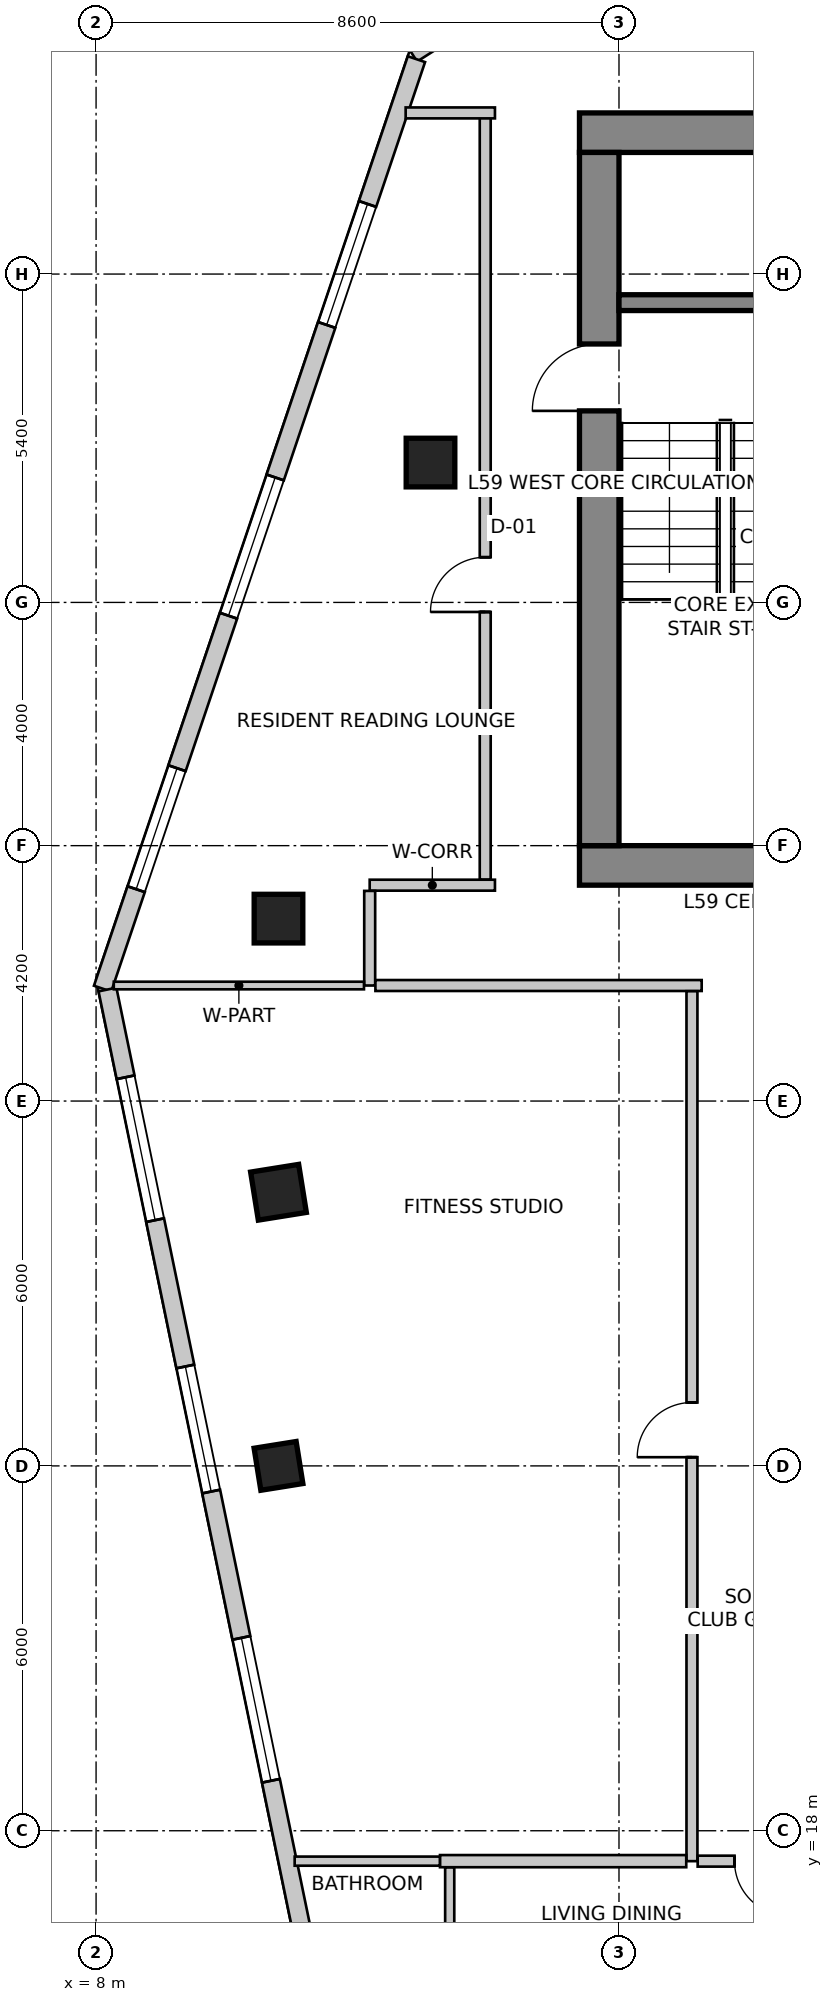
"""IFC4 building model, lengths in metres.
Left out: names, types, materials, properties, quantities, classifications, styles, units other than length and angle.
Written with IfcOpenShell. Run it as: python <this file> out.ifc"""

import sys

from ifc_helpers import new_model, si_unit, direction, frame, frame_2d, origin, origin_2d, place, context, subcontext, project, spatial, rectangle, extrude, source, transform, mapped, element, fill, save


model = new_model("IFC4")
c1 = context("Model", 3, precision=1e-05, world=origin(), true_north=direction((0.0, 1.0)))
c2 = subcontext(c1, "Body", "Model", "MODEL_VIEW")
j1 = project(units=[si_unit("LENGTHUNIT", "METRE"), si_unit("PLANEANGLEUNIT", "RADIAN")], contexts=[c1])
p1 = place(None, origin())
s1 = spatial("IfcSite", under=j1, at=p1, CompositionType="ELEMENT")
p2 = place(p1, origin())
s2 = spatial("IfcBuilding", under=s1, at=p2, CompositionType="ELEMENT")
p3 = place(p2, frame((0.0, 0.0, 232.4)))
s3 = spatial("IfcBuildingStorey", under=s2, at=p3, CompositionType="ELEMENT", Elevation=232.4)
p4 = place(p3, frame((15.95, 45.925, 0.0), z_axis=(0.0, 0.0, 1.0), x_axis=(1.0, 0.0, 0.0)))
e1 = element("IfcWall", 1, at=p4, inside=s3, PredefinedType="SHEAR", context=c2, shape_type="SweptSolid", body=[
    extrude(rectangle(XDim=15.7, YDim=0.65, at=frame_2d((7.85, 0.0))), origin(), (0.0, 0.0, 1.0), 3.5),
])
p5 = place(p3, frame((15.95, 33.875, 0.0), z_axis=(0.0, 0.0, 1.0), x_axis=(1.0, 0.0, 0.0)))
e2 = element("IfcWall", 2, at=p5, inside=s3, PredefinedType="SHEAR", context=c2, shape_type="SweptSolid", body=[
    extrude(rectangle(XDim=15.7, YDim=0.65, at=frame_2d((7.85, 0.0))), origin(), (0.0, 0.0, 1.0), 3.5),
])
m1 = source(origin(), c2, "Body", "SweptSolid", [
    extrude(rectangle(XDim=1.1, YDim=2.15, at=frame_2d((0.55, 1.075))), frame((0.0, 0.335, 0.0), z_axis=(0.0, -1.0, 0.0), x_axis=(1.0, 0.0, 0.0)), (0.0, 0.0, 1.0), 0.67),
])
p6 = place(p5, frame((10.08, 0.0, 0.0)))
e3 = element("IfcOpeningElement", 3, at=p6, cuts=e2, PredefinedType="OPENING", context=c2, shape_type="MappedRepresentation", body=[
    mapped(m1, transform((0.0, 0.0, 0.0), scale=1.0)),
])
p7 = place(p3, frame((16.275, 34.2, 0.0), z_axis=(0.0, 0.0, 1.0), x_axis=(0.0, 1.0, 0.0)))
e4 = element("IfcWall", 4, at=p7, inside=s3, PredefinedType="SHEAR", context=c2, shape_type="SweptSolid", body=[
    extrude(rectangle(XDim=11.4, YDim=0.65, at=frame_2d((5.7, 0.0))), origin(), (0.0, 0.0, 1.0), 3.5),
])
p8 = place(p7, frame((7.15, 0.0, 0.0)))
e5 = element("IfcOpeningElement", 5, at=p8, cuts=e4, PredefinedType="OPENING", context=c2, shape_type="MappedRepresentation", body=[
    mapped(m1, transform((0.0, 0.0, 0.0), scale=1.0)),
])
p9 = place(p3, frame((16.6, 43.13, 0.0), z_axis=(0.0, 0.0, 1.0), x_axis=(1.0, 0.0, 0.0)))
e6 = element("IfcWall", 6, at=p9, inside=s3, PredefinedType="SHEAR", context=c2, shape_type="SweptSolid", body=[
    extrude(rectangle(XDim=3.5, YDim=0.26, at=frame_2d((1.75, 0.0))), origin(), (0.0, 0.0, 1.0), 3.5),
])
m2 = source(origin(), c2, "Body", "SweptSolid", [
    extrude(rectangle(XDim=0.8, YDim=0.8, at=origin_2d()), origin(), (0.0, 0.0, 1.0), 3.5),
])
for number, where, z_axis, x_axis in (
    (7, (11.0, 33.0, 0.0), (0.0, 0.0, 1.0), (1.0, 0.0, 0.0)),
    (8, (13.5, 40.5, 0.0), (0.0, 0.0, 1.0), (1.0, 0.0, 0.0)),
    (9, (11.0, 28.5, 0.0), (0.0, 0.0, 1.0), (0.158, -0.987, 0.0)),
):
    element("IfcColumn", number, at=place(p3, frame(where, z_axis=z_axis, x_axis=x_axis)), inside=s3, PredefinedType="COLUMN", context=c2, shape_type="MappedRepresentation", body=[
        mapped(m2, transform((0.0, 0.0, 0.0), scale=1.0)),
    ])
m3 = source(origin(), c2, "Body", "SweptSolid", [
    extrude(rectangle(XDim=0.7, YDim=0.7, at=origin_2d()), origin(), (0.0, 0.0, 1.0), 3.5),
])
p10 = place(p3, frame((11.0, 24.0, 0.0), z_axis=(0.0, 0.0, 1.0), x_axis=(0.158158067254, -0.987413806751, 0.0)))
e10 = element("IfcColumn", 10, at=p10, inside=s3, PredefinedType="COLUMN", context=c2, shape_type="MappedRepresentation", body=[
    mapped(m3, transform((0.0, 0.0, 0.0), scale=1.0)),
])
p11 = place(p3, frame((21.874, 52.742, 0.0), z_axis=(0.0, 0.0, 1.0), x_axis=(-0.84365659959, -0.536883173482, 0.0)))
e11 = element("IfcWall", 11, at=p11, inside=s3, PredefinedType="SOLIDWALL", context=c2, shape_type="SweptSolid", body=[
    extrude(rectangle(XDim=10.283, YDim=0.3, at=frame_2d((5.142, 0.0))), origin(), (0.0, 0.0, 1.0), 3.25),
])
m4 = source(origin(), c2, "Body", "SweptSolid", [
    extrude(rectangle(XDim=2.4, YDim=2.2, at=frame_2d((1.2, 1.1))), frame((0.0, 0.16, 0.0), z_axis=(0.0, -1.0, 0.0), x_axis=(1.0, 0.0, 0.0)), (0.0, 0.0, 1.0), 0.32),
])
p12 = place(p11, frame((3.307, 0.0, 0.85)))
e12 = element("IfcOpeningElement", 12, at=p12, cuts=e11, PredefinedType="OPENING", context=c2, shape_type="MappedRepresentation", body=[
    mapped(m4, transform((0.0, 0.0, 0.0), scale=1.0)),
])
p13 = place(p3, frame((13.269, 47.134, 0.0), z_axis=(0.0, 0.0, 1.0), x_axis=(-0.319920776449, -0.947444297464, 0.0)))
e13 = element("IfcWall", 13, at=p13, inside=s3, PredefinedType="SOLIDWALL", context=c2, shape_type="SweptSolid", body=[
    extrude(rectangle(XDim=16.133, YDim=0.3, at=frame_2d((8.067, 0.0))), origin(), (0.0, 0.0, 1.0), 3.25),
])
m5 = source(origin(), c2, "Body", "SweptSolid", [
    extrude(rectangle(XDim=2.1, YDim=2.0, at=frame_2d((1.05, 1.0))), frame((0.0, 0.16, 0.0), z_axis=(0.0, -1.0, 0.0), x_axis=(1.0, 0.0, 0.0)), (0.0, 0.0, 1.0), 0.32),
])
p14 = place(p13, frame((2.513, 0.0, 0.85)))
e14 = element("IfcOpeningElement", 14, at=p14, cuts=e13, PredefinedType="OPENING", context=c2, shape_type="MappedRepresentation", body=[
    mapped(m5, transform((0.0, 0.0, 0.0), scale=1.0)),
])
p15 = place(p13, frame((7.26, 0.0, 0.85)))
e15 = element("IfcOpeningElement", 15, at=p15, cuts=e13, PredefinedType="OPENING", context=c2, shape_type="MappedRepresentation", body=[
    mapped(m4, transform((0.0, 0.0, 0.0), scale=1.0)),
])
p16 = place(p13, frame((12.307, 0.0, 0.85)))
e16 = element("IfcOpeningElement", 16, at=p16, cuts=e13, PredefinedType="OPENING", context=c2, shape_type="MappedRepresentation", body=[
    mapped(m5, transform((0.0, 0.0, 0.0), scale=1.0)),
])
p17 = place(p3, frame((8.188, 31.834, 0.0), z_axis=(0.0, 0.0, 1.0), x_axis=(0.202303475707, -0.979322880217, 0.0)))
e17 = element("IfcWall", 17, at=p17, inside=s3, PredefinedType="SOLIDWALL", context=c2, shape_type="SweptSolid", body=[
    extrude(rectangle(XDim=15.766, YDim=0.3, at=frame_2d((7.883, 0.0))), origin(), (0.0, 0.0, 1.0), 3.25),
])
p18 = place(p17, frame((1.473, 0.0, 0.85)))
e18 = element("IfcOpeningElement", 18, at=p18, cuts=e17, PredefinedType="OPENING", context=c2, shape_type="MappedRepresentation", body=[
    mapped(m4, transform((0.0, 0.0, 0.0), scale=1.0)),
])
p19 = place(p17, frame((6.33, 0.0, 0.85)))
e19 = element("IfcOpeningElement", 19, at=p19, cuts=e17, PredefinedType="OPENING", context=c2, shape_type="MappedRepresentation", body=[
    mapped(m5, transform((0.0, 0.0, 0.0), scale=1.0)),
])
p20 = place(p17, frame((10.887, 0.0, 0.85)))
e20 = element("IfcOpeningElement", 20, at=p20, cuts=e17, PredefinedType="OPENING", context=c2, shape_type="MappedRepresentation", body=[
    mapped(m4, transform((0.0, 0.0, 0.0), scale=1.0)),
])
p21 = place(p3, frame((12.5, 33.55, 0.0), z_axis=(0.0, 0.0, 1.0), x_axis=(1.0, 0.0, 0.0)))
e21 = element("IfcWall", 21, at=p21, inside=s3, PredefinedType="PARTITIONING", context=c2, shape_type="SweptSolid", body=[
    extrude(rectangle(XDim=2.06, YDim=0.18, at=frame_2d((1.03, 0.0))), origin(), (0.0, 0.0, 1.0), 3.25),
])
p22 = place(p3, frame((12.5, 31.9, 0.0), z_axis=(0.0, 0.0, 1.0), x_axis=(0.0, 1.0, 0.0)))
e22 = element("IfcWall", 22, at=p22, inside=s3, PredefinedType="PARTITIONING", context=c2, shape_type="SweptSolid", body=[
    extrude(rectangle(XDim=1.556, YDim=0.18, at=frame_2d((0.778, 0.0))), origin(), (0.0, 0.0, 1.0), 2.934),
])
p23 = place(p3, frame((17.96, 31.9, 0.0), z_axis=(0.0, 0.0, 1.0), x_axis=(-1.0, 0.0, 0.0)))
e23 = element("IfcWall", 23, at=p23, inside=s3, PredefinedType="PARTITIONING", context=c2, shape_type="SweptSolid", body=[
    extrude(rectangle(XDim=5.366, YDim=0.18, at=frame_2d((2.683, 0.0))), origin(), (0.0, 0.0, 1.0), 2.934),
])
p24 = place(p3, frame((14.4, 33.644, 0.0), z_axis=(0.0, 0.0, 1.0), x_axis=(0.0, 1.0, 0.0)))
e24 = element("IfcWall", 24, at=p24, inside=s3, PredefinedType="PARTITIONING", context=c2, shape_type="SweptSolid", body=[
    extrude(rectangle(XDim=12.606, YDim=0.18, at=frame_2d((6.303, 0.0))), origin(), (0.0, 0.0, 1.0), 3.25),
])
m6 = source(origin(), c2, "Body", "SweptSolid", [
    extrude(rectangle(XDim=0.9, YDim=2.15, at=frame_2d((0.45, 1.075))), frame((0.0, 0.1, 0.0), z_axis=(0.0, -1.0, 0.0), x_axis=(1.0, 0.0, 0.0)), (0.0, 0.0, 1.0), 0.2),
])
p25 = place(p24, frame((4.399, 0.0, 0.0)))
e25 = element("IfcOpeningElement", 25, at=p25, cuts=e24, PredefinedType="OPENING", context=c2, shape_type="MappedRepresentation", body=[
    mapped(m6, transform((0.0, 0.0, 0.0), scale=1.0)),
])
p26 = place(p3, frame((14.56, 46.25, 0.0), z_axis=(0.0, 0.0, 1.0), x_axis=(-1.0, 0.0, 0.0)))
e26 = element("IfcWall", 26, at=p26, inside=s3, PredefinedType="PARTITIONING", context=c2, shape_type="SweptSolid", body=[
    extrude(rectangle(XDim=1.469, YDim=0.18, at=frame_2d((0.734, 0.0))), origin(), (0.0, 0.0, 1.0), 3.25),
])
p27 = place(p3, frame((12.406, 31.9, 0.0), z_axis=(0.0, 0.0, 1.0), x_axis=(-1.0, 0.0, 0.0)))
e27 = element("IfcWall", 27, at=p27, inside=s3, PredefinedType="PARTITIONING", context=c2, shape_type="SweptSolid", body=[
    extrude(rectangle(XDim=4.115, YDim=0.125, at=frame_2d((2.057, 0.0))), origin(), (0.0, 0.0, 1.0), 2.542),
])
p28 = place(p3, frame((17.8, 17.5, 0.0), z_axis=(0.0, 0.0, 1.0), x_axis=(0.0, 1.0, 0.0)))
e28 = element("IfcWall", 28, at=p28, inside=s3, PredefinedType="PARTITIONING", context=c2, shape_type="SweptSolid", body=[
    extrude(rectangle(XDim=14.306, YDim=0.18, at=frame_2d((7.153, 0.0))), origin(), (0.0, 0.0, 1.0), 2.766),
])
p29 = place(p28, frame((6.643, 0.0, 0.0)))
e29 = element("IfcOpeningElement", 29, at=p29, cuts=e28, PredefinedType="OPENING", context=c2, shape_type="MappedRepresentation", body=[
    mapped(m6, transform((0.0, 0.0, 0.0), scale=1.0)),
])
p30 = place(p3, frame((20.006, 17.5, 0.0), z_axis=(0.0, 0.0, 1.0), x_axis=(-1.0, 0.0, 0.0)))
e30 = element("IfcWall", 30, at=p30, inside=s3, PredefinedType="PARTITIONING", context=c2, shape_type="SweptSolid", body=[
    extrude(rectangle(XDim=2.112, YDim=0.18, at=frame_2d((1.056, 0.0))), origin(), (0.0, 0.0, 1.0), 3.25),
])
p31 = place(p30, frame((0.606, 0.0, 0.0)))
e31 = element("IfcOpeningElement", 31, at=p31, cuts=e30, PredefinedType="OPENING", context=c2, shape_type="MappedRepresentation", body=[
    mapped(m6, transform((0.0, 0.0, 0.0), scale=1.0)),
])
p32 = place(p3, frame((17.706, 17.5, 0.0), z_axis=(0.0, 0.0, 1.0), x_axis=(-1.0, 0.0, 0.0)))
e32 = element("IfcWall", 32, at=p32, inside=s3, PredefinedType="PARTITIONING", context=c2, shape_type="SweptSolid", body=[
    extrude(rectangle(XDim=4.05, YDim=0.2, at=frame_2d((2.025, 0.0))), origin(), (0.0, 0.0, 1.0), 3.25),
])
p33 = place(p3, frame((13.654, 17.5, 0.0), z_axis=(0.0, 0.0, 1.0), x_axis=(-1.0, 0.0, 0.0)))
e33 = element("IfcWall", 33, at=p33, inside=s3, PredefinedType="PARTITIONING", context=c2, shape_type="SweptSolid", body=[
    extrude(rectangle(XDim=2.388, YDim=0.15, at=frame_2d((1.194, 0.0))), origin(), (0.0, 0.0, 1.0), 3.25),
])
p34 = place(p3, frame((13.816, 12.865, 0.0), z_axis=(0.0, 0.0, 1.0), x_axis=(0.0, 1.0, 0.0)))
e34 = element("IfcWall", 34, at=p34, inside=s3, PredefinedType="PARTITIONING", context=c2, shape_type="SweptSolid", body=[
    extrude(rectangle(XDim=4.531, YDim=0.15, at=frame_2d((2.266, 0.0))), origin(), (0.0, 0.0, 1.0), 3.25),
])
m7 = source(origin(), c2, "Body", "SweptSolid", [
    extrude(rectangle(XDim=0.85, YDim=2.15, at=frame_2d((0.425, 1.075))), frame((0.0, 0.085, 0.0), z_axis=(0.0, -1.0, 0.0), x_axis=(1.0, 0.0, 0.0)), (0.0, 0.0, 1.0), 0.17),
])
p35 = place(p34, frame((1.841, 0.0, 0.0)))
e35 = element("IfcOpeningElement", 35, at=p35, cuts=e34, PredefinedType="OPENING", context=c2, shape_type="MappedRepresentation", body=[
    mapped(m7, transform((0.0, 0.0, 0.0), scale=1.0)),
])
m8 = source(origin(), c2, "Body", "SweptSolid", [
    extrude(rectangle(XDim=2.1, YDim=2.0, at=frame_2d((1.05, 1.0))), frame((0.0, -0.015, 0.0), z_axis=(0.0, -1.0, 0.0), x_axis=(1.0, 0.0, 0.0)), (0.0, 0.0, 1.0), 0.06),
])
p36 = place(p14, origin())
e36 = element("IfcWindow", 36, at=p36, inside=s3, PartitioningType="SINGLE_PANEL", PredefinedType="WINDOW", context=c2, shape_type="MappedRepresentation", body=[
    mapped(m8, transform((0.0, 0.0, 0.0), scale=1.0)),
])
fill(e14, e36)
m9 = source(origin(), c2, "Body", "SweptSolid", [
    extrude(rectangle(XDim=2.4, YDim=2.2, at=frame_2d((1.2, 1.1))), frame((0.0, -0.015, 0.0), z_axis=(0.0, -1.0, 0.0), x_axis=(1.0, 0.0, 0.0)), (0.0, 0.0, 1.0), 0.06),
])
p37 = place(p15, origin())
e37 = element("IfcWindow", 37, at=p37, inside=s3, PartitioningType="SINGLE_PANEL", PredefinedType="WINDOW", context=c2, shape_type="MappedRepresentation", body=[
    mapped(m9, transform((0.0, 0.0, 0.0), scale=1.0)),
])
fill(e15, e37)
p38 = place(p16, origin())
e38 = element("IfcWindow", 38, at=p38, inside=s3, PartitioningType="SINGLE_PANEL", PredefinedType="WINDOW", context=c2, shape_type="MappedRepresentation", body=[
    mapped(m8, transform((0.0, 0.0, 0.0), scale=1.0)),
])
fill(e16, e38)
p39 = place(p18, origin())
e39 = element("IfcWindow", 39, at=p39, inside=s3, PartitioningType="SINGLE_PANEL", PredefinedType="WINDOW", context=c2, shape_type="MappedRepresentation", body=[
    mapped(m9, transform((0.0, 0.0, 0.0), scale=1.0)),
])
fill(e18, e39)
p40 = place(p19, origin())
e40 = element("IfcWindow", 40, at=p40, inside=s3, PartitioningType="SINGLE_PANEL", PredefinedType="WINDOW", context=c2, shape_type="MappedRepresentation", body=[
    mapped(m8, transform((0.0, 0.0, 0.0), scale=1.0)),
])
fill(e19, e40)
p41 = place(p20, origin())
e41 = element("IfcWindow", 41, at=p41, inside=s3, PartitioningType="SINGLE_PANEL", PredefinedType="WINDOW", context=c2, shape_type="MappedRepresentation", body=[
    mapped(m9, transform((0.0, 0.0, 0.0), scale=1.0)),
])
fill(e20, e41)
m10 = source(origin(), c2, "Body", "SweptSolid", [
    extrude(rectangle(XDim=1.1, YDim=2.15, at=frame_2d((0.55, 1.075))), frame((0.0, 0.025, 0.0), z_axis=(0.0, -1.0, 0.0), x_axis=(1.0, 0.0, 0.0)), (0.0, 0.0, 1.0), 0.05),
])
p42 = place(p8, origin())
e42 = element("IfcDoor", 42, at=p42, inside=s3, OperationType="SINGLE_SWING_LEFT", PredefinedType="DOOR", context=c2, shape_type="MappedRepresentation", body=[
    mapped(m10, transform((0.0, 0.0, 0.0), scale=1.0)),
])
fill(e5, e42)
m11 = source(origin(), c2, "Body", "SweptSolid", [
    extrude(rectangle(XDim=0.9, YDim=2.15, at=frame_2d((0.45, 1.075))), frame((0.0, 0.025, 0.0), z_axis=(0.0, -1.0, 0.0), x_axis=(1.0, 0.0, 0.0)), (0.0, 0.0, 1.0), 0.05),
])
p43 = place(p25, origin())
e43 = element("IfcDoor", 43, at=p43, inside=s3, OperationType="SINGLE_SWING_LEFT", PredefinedType="DOOR", context=c2, shape_type="MappedRepresentation", body=[
    mapped(m11, transform((0.0, 0.0, 0.0), scale=1.0)),
])
fill(e25, e43)
p44 = place(p29, origin())
e44 = element("IfcDoor", 44, at=p44, inside=s3, OperationType="SINGLE_SWING_LEFT", PredefinedType="DOOR", context=c2, shape_type="MappedRepresentation", body=[
    mapped(m11, transform((0.0, 0.0, 0.0), scale=1.0)),
])
fill(e29, e44)
m12 = source(origin(), c2, "Body", "SweptSolid", [
    extrude(rectangle(XDim=0.9, YDim=2.15, at=frame_2d((0.45, 1.075))), frame((0.0, 0.025, 0.0), z_axis=(0.0, -1.0, 0.0), x_axis=(1.0, 0.0, 0.0)), (0.0, 0.0, 1.0), 0.05),
])
p45 = place(p31, origin())
e45 = element("IfcDoor", 45, at=p45, inside=s3, OperationType="SINGLE_SWING_LEFT", PredefinedType="DOOR", context=c2, shape_type="MappedRepresentation", body=[
    mapped(m12, transform((0.0, 0.0, 0.0), scale=1.0)),
])
fill(e31, e45)
save(model, sys.argv[1])
